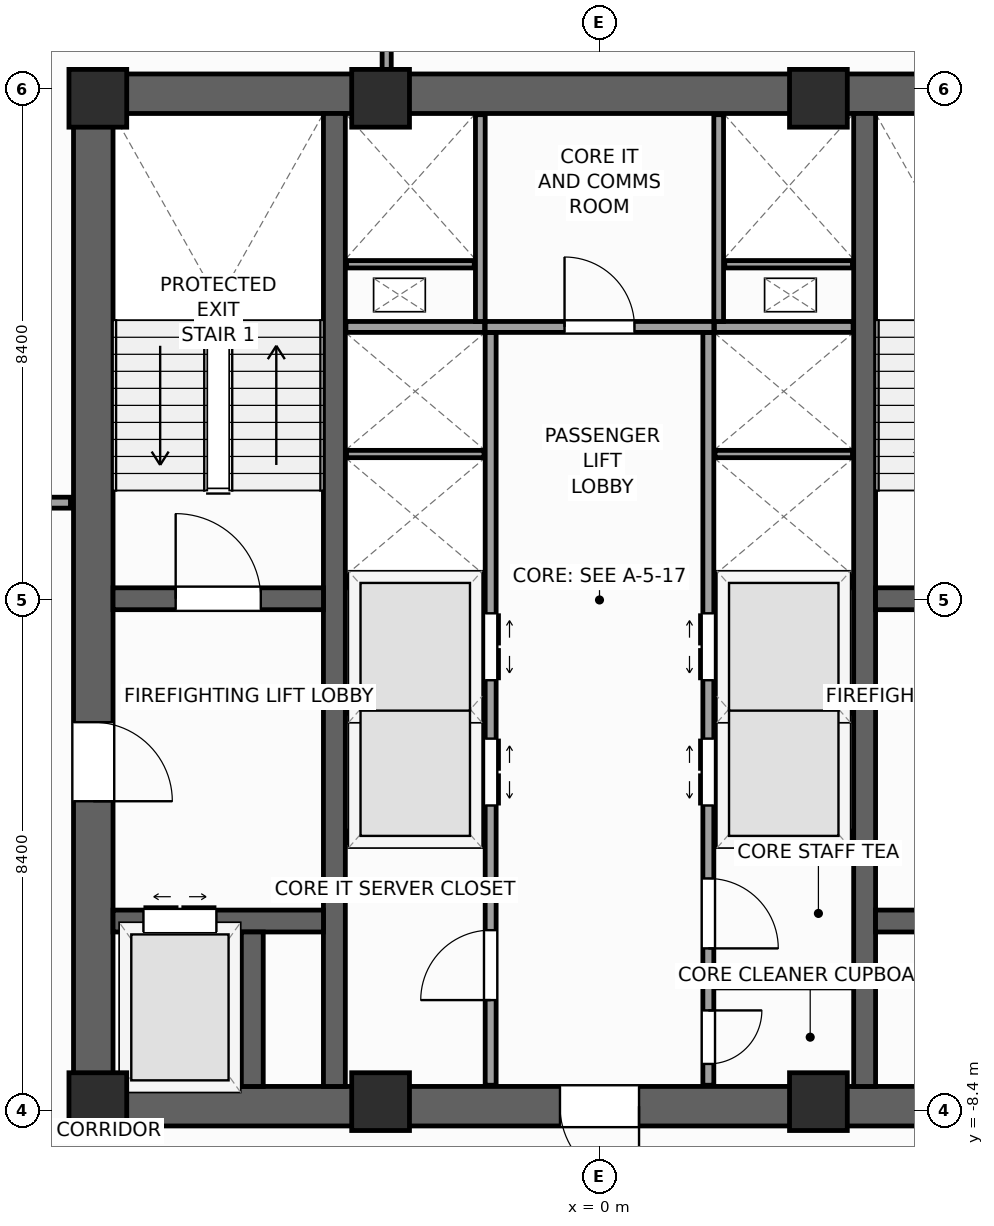
"""IFC4 building model, lengths in metres.
Left out: names, types, materials, properties, quantities, classifications, styles, units other than length and angle.
Written with IfcOpenShell. Run it as: python <this file> out.ifc"""

import sys

from ifc_helpers import new_model, si_unit, direction, frame, frame_2d, origin, origin_2d, place, context, subcontext, project, spatial, rectangle, extrude, source, transform, mapped, element, fill, save


model = new_model("IFC4")
c1 = context("Model", 3, precision=1e-05, world=origin(), true_north=direction((0.0, 1.0)))
c2 = subcontext(c1, "Body", "Model", "MODEL_VIEW")
j1 = project(units=[si_unit("LENGTHUNIT", "METRE"), si_unit("PLANEANGLEUNIT", "RADIAN")], contexts=[c1])
p1 = place(None, origin())
s1 = spatial("IfcSite", under=j1, at=p1, CompositionType="ELEMENT")
p2 = place(p1, origin())
s2 = spatial("IfcBuilding", under=s1, at=p2, CompositionType="ELEMENT")
p3 = place(p2, frame((0.0, 0.0, 164.4)))
s3 = spatial("IfcBuildingStorey", under=s2, at=p3, CompositionType="ELEMENT", Elevation=164.4)
p4 = place(p3, frame((-8.65, -8.325, 0.0), z_axis=(0.0, 0.0, 1.0), x_axis=(1.0, 0.0, 0.0)))
e1 = element("IfcWall", 1, at=p4, inside=s3, PredefinedType="SHEAR", context=c2, shape_type="SweptSolid", body=[
    extrude(rectangle(XDim=17.3, YDim=0.65, at=frame_2d((8.65, 0.0))), origin(), (0.0, 0.0, 1.0), 4.0),
])
p5 = place(p4, frame((8.0, 0.0, 0.0)))
e2 = element("IfcOpeningElement", 2, at=p5, cuts=e1, PredefinedType="OPENING", context=c2, shape_type="SweptSolid", body=[
    extrude(rectangle(XDim=1.3, YDim=2.2, at=frame_2d((0.65, 1.1))), frame((0.0, 0.335, 0.0), z_axis=(0.0, -1.0, 0.0), x_axis=(1.0, 0.0, 0.0)), (0.0, 0.0, 1.0), 0.67),
])
p6 = place(p3, frame((-8.65, 8.325, 0.0), z_axis=(0.0, 0.0, 1.0), x_axis=(1.0, 0.0, 0.0)))
e3 = element("IfcWall", 3, at=p6, inside=s3, PredefinedType="SHEAR", context=c2, shape_type="SweptSolid", body=[
    extrude(rectangle(XDim=17.3, YDim=0.65, at=frame_2d((8.65, 0.0))), origin(), (0.0, 0.0, 1.0), 4.0),
])
p7 = place(p3, frame((-8.325, -8.0, 0.0), z_axis=(0.0, 0.0, 1.0), x_axis=(0.0, 1.0, 0.0)))
e4 = element("IfcWall", 4, at=p7, inside=s3, PredefinedType="SHEAR", context=c2, shape_type="SweptSolid", body=[
    extrude(rectangle(XDim=16.0, YDim=0.65, at=frame_2d((8.0, 0.0))), origin(), (0.0, 0.0, 1.0), 4.0),
])
p8 = place(p7, frame((4.69, 0.0, 0.0)))
e5 = element("IfcOpeningElement", 5, at=p8, cuts=e4, PredefinedType="OPENING", context=c2, shape_type="SweptSolid", body=[
    extrude(rectangle(XDim=1.3, YDim=2.2, at=frame_2d((0.65, 1.1))), frame((0.0, 0.335, 0.0), z_axis=(0.0, -1.0, 0.0), x_axis=(1.0, 0.0, 0.0)), (0.0, 0.0, 1.0), 0.67),
])
for number, where, z_axis, x_axis in (
    (6, (-4.36, -8.0, 0.0), (0.0, 0.0, 1.0), (0.0, 1.0, 0.0)),
    (7, (4.36, -8.0, 0.0), (0.0, 0.0, 1.0), (0.0, 1.0, 0.0)),
):
    element("IfcWall", number, at=place(p3, frame(where, z_axis=z_axis, x_axis=x_axis)), inside=s3, PredefinedType="SHEAR", context=c2, shape_type="SweptSolid", body=[
        extrude(rectangle(XDim=16.0, YDim=0.36, at=frame_2d((8.0, 0.0))), origin(), (0.0, 0.0, 1.0), 4.0),
    ])
p9 = place(p3, frame((-8.0, 0.02, 0.0), z_axis=(0.0, 0.0, 1.0), x_axis=(1.0, 0.0, 0.0)))
e8 = element("IfcWall", 8, at=p9, inside=s3, PredefinedType="SHEAR", context=c2, shape_type="SweptSolid", body=[
    extrude(rectangle(XDim=3.46, YDim=0.36, at=frame_2d((1.73, 0.0))), origin(), (0.0, 0.0, 1.0), 4.0),
])
p10 = place(p9, frame((1.03, 0.0, 0.0)))
e9 = element("IfcOpeningElement", 9, at=p10, cuts=e8, PredefinedType="OPENING", context=c2, shape_type="SweptSolid", body=[
    extrude(rectangle(XDim=1.4, YDim=2.2, at=frame_2d((0.7, 1.1))), frame((0.0, 0.19, 0.0), z_axis=(0.0, -1.0, 0.0), x_axis=(1.0, 0.0, 0.0)), (0.0, 0.0, 1.0), 0.38),
])
p11 = place(p3, frame((4.54, 0.02, 0.0), z_axis=(0.0, 0.0, 1.0), x_axis=(1.0, 0.0, 0.0)))
e10 = element("IfcWall", 10, at=p11, inside=s3, PredefinedType="SHEAR", context=c2, shape_type="SweptSolid", body=[
    extrude(rectangle(XDim=3.46, YDim=0.36, at=frame_2d((1.73, 0.0))), origin(), (0.0, 0.0, 1.0), 4.0),
])
p12 = place(p11, frame((1.03, 0.0, 0.0)))
e11 = element("IfcOpeningElement", 11, at=p12, cuts=e10, PredefinedType="OPENING", context=c2, shape_type="SweptSolid", body=[
    extrude(rectangle(XDim=1.4, YDim=2.2, at=frame_2d((0.7, 1.1))), frame((0.0, 0.19, 0.0), z_axis=(0.0, -1.0, 0.0), x_axis=(1.0, 0.0, 0.0)), (0.0, 0.0, 1.0), 0.38),
])
p13 = place(p3, frame((-8.0, -5.28, 0.0), z_axis=(0.0, 0.0, 1.0), x_axis=(1.0, 0.0, 0.0)))
e12 = element("IfcWall", 12, at=p13, inside=s3, PredefinedType="SHEAR", context=c2, shape_type="SweptSolid", body=[
    extrude(rectangle(XDim=3.46, YDim=0.36, at=frame_2d((1.73, 0.0))), origin(), (0.0, 0.0, 1.0), 4.0),
])
p14 = place(p13, frame((0.5, 0.0, 0.0)))
e13 = element("IfcOpeningElement", 13, at=p14, cuts=e12, PredefinedType="OPENING", context=c2, shape_type="SweptSolid", body=[
    extrude(rectangle(XDim=1.2, YDim=2.25, at=frame_2d((0.6, 1.125))), frame((0.0, 0.19, 0.0), z_axis=(0.0, -1.0, 0.0), x_axis=(1.0, 0.0, 0.0)), (0.0, 0.0, 1.0), 0.38),
])
p15 = place(p3, frame((4.54, -5.28, 0.0), z_axis=(0.0, 0.0, 1.0), x_axis=(1.0, 0.0, 0.0)))
e14 = element("IfcWall", 14, at=p15, inside=s3, PredefinedType="SHEAR", context=c2, shape_type="SweptSolid", body=[
    extrude(rectangle(XDim=3.46, YDim=0.36, at=frame_2d((1.73, 0.0))), origin(), (0.0, 0.0, 1.0), 4.0),
])
p16 = place(p15, frame((1.76, 0.0, 0.0)))
e15 = element("IfcOpeningElement", 15, at=p16, cuts=e14, PredefinedType="OPENING", context=c2, shape_type="SweptSolid", body=[
    extrude(rectangle(XDim=1.2, YDim=2.25, at=frame_2d((0.6, 1.125))), frame((0.0, 0.19, 0.0), z_axis=(0.0, -1.0, 0.0), x_axis=(1.0, 0.0, 0.0)), (0.0, 0.0, 1.0), 0.38),
])
p17 = place(p3, frame((-5.71, -8.0, 0.0), z_axis=(0.0, 0.0, 1.0), x_axis=(0.0, 1.0, 0.0)))
e16 = element("IfcWall", 16, at=p17, inside=s3, PredefinedType="SHEAR", context=c2, shape_type="SweptSolid", body=[
    extrude(rectangle(XDim=2.54, YDim=0.36, at=frame_2d((1.27, 0.0))), origin(), (0.0, 0.0, 1.0), 4.0),
])
m1 = source(origin(), c2, "Body", "SweptSolid", [
    extrude(rectangle(XDim=0.95, YDim=0.95, at=origin_2d()), origin(), (0.0, 0.0, 1.0), 4.0),
])
for number, where, z_axis, x_axis in (
    (17, (-8.25, -8.25, 0.0), (0.0, 0.0, 1.0), (1.0, 0.0, 0.0)),
    (18, (-8.25, 8.25, 0.0), (0.0, 0.0, 1.0), (1.0, 0.0, 0.0)),
    (19, (-3.6, -8.25, 0.0), (0.0, 0.0, 1.0), (1.0, 0.0, 0.0)),
    (20, (3.6, -8.25, 0.0), (0.0, 0.0, 1.0), (1.0, 0.0, 0.0)),
    (21, (-3.6, 8.25, 0.0), (0.0, 0.0, 1.0), (1.0, 0.0, 0.0)),
    (22, (3.6, 8.25, 0.0), (0.0, 0.0, 1.0), (1.0, 0.0, 0.0)),
):
    element("IfcColumn", number, at=place(p3, frame(where, z_axis=z_axis, x_axis=x_axis)), inside=s3, PredefinedType="PILASTER", context=c2, shape_type="MappedRepresentation", body=[
        mapped(m1, transform((0.0, 0.0, 0.0), scale=1.0)),
    ])
p18 = place(p3, frame((-1.79, -7.98, 0.0), z_axis=(0.0, 0.0, 1.0), x_axis=(0.0, 1.0, 0.0)))
e23 = element("IfcWall", 23, at=p18, inside=s3, PredefinedType="PARTITIONING", context=c2, shape_type="SweptSolid", body=[
    extrude(rectangle(XDim=12.38, YDim=0.18, at=frame_2d((6.19, 0.0))), origin(), (0.0, 0.0, 1.0), 3.74),
])
p19 = place(p18, frame((4.6, 0.0, 0.0)))
e24 = element("IfcOpeningElement", 24, at=p19, cuts=e23, PredefinedType="OPENING", context=c2, shape_type="SweptSolid", body=[
    extrude(rectangle(XDim=1.1, YDim=2.2, at=frame_2d((0.55, 1.1))), frame((0.0, 0.1, 0.0), z_axis=(0.0, -1.0, 0.0), x_axis=(1.0, 0.0, 0.0)), (0.0, 0.0, 1.0), 0.2),
])
p20 = place(p18, frame((6.66, 0.0, 0.0)))
e25 = element("IfcOpeningElement", 25, at=p20, cuts=e23, PredefinedType="OPENING", context=c2, shape_type="SweptSolid", body=[
    extrude(rectangle(XDim=1.1, YDim=2.2, at=frame_2d((0.55, 1.1))), frame((0.0, 0.1, 0.0), z_axis=(0.0, -1.0, 0.0), x_axis=(1.0, 0.0, 0.0)), (0.0, 0.0, 1.0), 0.2),
])
p21 = place(p18, frame((1.4, 0.0, 0.0)))
e26 = element("IfcOpeningElement", 26, at=p21, cuts=e23, PredefinedType="OPENING", context=c2, shape_type="SweptSolid", body=[
    extrude(rectangle(XDim=1.15, YDim=2.25, at=frame_2d((0.575, 1.125))), frame((0.0, 0.1, 0.0), z_axis=(0.0, -1.0, 0.0), x_axis=(1.0, 0.0, 0.0)), (0.0, 0.0, 1.0), 0.2),
])
p22 = place(p3, frame((1.79, -7.98, 0.0), z_axis=(0.0, 0.0, 1.0), x_axis=(0.0, 1.0, 0.0)))
e27 = element("IfcWall", 27, at=p22, inside=s3, PredefinedType="PARTITIONING", context=c2, shape_type="SweptSolid", body=[
    extrude(rectangle(XDim=12.38, YDim=0.18, at=frame_2d((6.19, 0.0))), origin(), (0.0, 0.0, 1.0), 3.74),
])
p23 = place(p22, frame((4.6, 0.0, 0.0)))
e28 = element("IfcOpeningElement", 28, at=p23, cuts=e27, PredefinedType="OPENING", context=c2, shape_type="SweptSolid", body=[
    extrude(rectangle(XDim=1.1, YDim=2.2, at=frame_2d((0.55, 1.1))), frame((0.0, 0.1, 0.0), z_axis=(0.0, -1.0, 0.0), x_axis=(1.0, 0.0, 0.0)), (0.0, 0.0, 1.0), 0.2),
])
p24 = place(p22, frame((6.66, 0.0, 0.0)))
e29 = element("IfcOpeningElement", 29, at=p24, cuts=e27, PredefinedType="OPENING", context=c2, shape_type="SweptSolid", body=[
    extrude(rectangle(XDim=1.1, YDim=2.2, at=frame_2d((0.55, 1.1))), frame((0.0, 0.1, 0.0), z_axis=(0.0, -1.0, 0.0), x_axis=(1.0, 0.0, 0.0)), (0.0, 0.0, 1.0), 0.2),
])
p25 = place(p22, frame((0.35, 0.0, 0.0)))
e30 = element("IfcOpeningElement", 30, at=p25, cuts=e27, PredefinedType="OPENING", context=c2, shape_type="SweptSolid", body=[
    extrude(rectangle(XDim=0.88, YDim=2.1, at=frame_2d((0.44, 1.05))), frame((0.0, 0.1, 0.0), z_axis=(0.0, -1.0, 0.0), x_axis=(1.0, 0.0, 0.0)), (0.0, 0.0, 1.0), 0.2),
])
p26 = place(p22, frame((2.25, 0.0, 0.0)))
e31 = element("IfcOpeningElement", 31, at=p26, cuts=e27, PredefinedType="OPENING", context=c2, shape_type="SweptSolid", body=[
    extrude(rectangle(XDim=1.15, YDim=2.25, at=frame_2d((0.575, 1.125))), frame((0.0, 0.1, 0.0), z_axis=(0.0, -1.0, 0.0), x_axis=(1.0, 0.0, 0.0)), (0.0, 0.0, 1.0), 0.2),
])
p27 = place(p3, frame((-1.88, 4.49, 0.0), z_axis=(0.0, 0.0, 1.0), x_axis=(1.0, 0.0, 0.0)))
e32 = element("IfcWall", 32, at=p27, inside=s3, PredefinedType="PARTITIONING", context=c2, shape_type="SweptSolid", body=[
    extrude(rectangle(XDim=3.76, YDim=0.18, at=frame_2d((1.88, 0.0))), origin(), (0.0, 0.0, 1.0), 3.74),
])
p28 = place(p27, frame((1.305, 0.0, 0.0)))
e33 = element("IfcOpeningElement", 33, at=p28, cuts=e32, PredefinedType="OPENING", context=c2, shape_type="SweptSolid", body=[
    extrude(rectangle(XDim=1.15, YDim=2.25, at=frame_2d((0.575, 1.125))), frame((0.0, 0.1, 0.0), z_axis=(0.0, -1.0, 0.0), x_axis=(1.0, 0.0, 0.0)), (0.0, 0.0, 1.0), 0.2),
])
for number, where, z_axis, x_axis in (
    (34, (-4.17, -3.9, 0.0), (0.0, 0.0, 1.0), (1.0, 0.0, 0.0)),
    (35, (1.89, -3.9, 0.0), (0.0, 0.0, 1.0), (1.0, 0.0, 0.0)),
    (36, (-4.17, 0.3, 0.0), (0.0, 0.0, 1.0), (1.0, 0.0, 0.0)),
    (37, (1.89, 0.3, 0.0), (0.0, 0.0, 1.0), (1.0, 0.0, 0.0)),
    (38, (-4.17, 4.49, 0.0), (0.0, 0.0, 1.0), (1.0, 0.0, 0.0)),
    (39, (1.89, 4.49, 0.0), (0.0, 0.0, 1.0), (1.0, 0.0, 0.0)),
):
    element("IfcWall", number, at=place(p3, frame(where, z_axis=z_axis, x_axis=x_axis)), inside=s3, PredefinedType="PARTITIONING", context=c2, shape_type="SweptSolid", body=[
        extrude(rectangle(XDim=2.28, YDim=0.18, at=frame_2d((1.14, 0.0))), origin(), (0.0, 0.0, 1.0), 3.74),
    ])
for number, where, z_axis, x_axis in (
    (40, (-4.16, -1.8, 0.0), (0.0, 0.0, 1.0), (1.0, 0.0, 0.0)),
    (41, (1.9, -1.8, 0.0), (0.0, 0.0, 1.0), (1.0, 0.0, 0.0)),
    (42, (-4.16, 2.4, 0.0), (0.0, 0.0, 1.0), (1.0, 0.0, 0.0)),
    (43, (1.9, 2.4, 0.0), (0.0, 0.0, 1.0), (1.0, 0.0, 0.0)),
):
    element("IfcWall", number, at=place(p3, frame(where, z_axis=z_axis, x_axis=x_axis)), inside=s3, PredefinedType="PARTITIONING", context=c2, shape_type="SweptSolid", body=[
        extrude(rectangle(XDim=2.26, YDim=0.12, at=frame_2d((1.13, 0.0))), origin(), (0.0, 0.0, 1.0), 3.74),
    ])
p29 = place(p3, frame((1.89, -6.3, 0.0), z_axis=(0.0, 0.0, 1.0), x_axis=(1.0, 0.0, 0.0)))
e44 = element("IfcWall", 44, at=p29, inside=s3, PredefinedType="PARTITIONING", context=c2, shape_type="SweptSolid", body=[
    extrude(rectangle(XDim=2.28, YDim=0.16, at=frame_2d((1.14, 0.0))), origin(), (0.0, 0.0, 1.0), 3.74),
])
for number, where, z_axis, x_axis in (
    (45, (-1.96, 4.58, 0.0), (0.0, 0.0, 1.0), (0.0, 1.0, 0.0)),
    (46, (1.96, 4.58, 0.0), (0.0, 0.0, 1.0), (0.0, 1.0, 0.0)),
):
    element("IfcWall", number, at=place(p3, frame(where, z_axis=z_axis, x_axis=x_axis)), inside=s3, PredefinedType="PARTITIONING", context=c2, shape_type="SweptSolid", body=[
        extrude(rectangle(XDim=3.4, YDim=0.16, at=frame_2d((1.7, 0.0))), origin(), (0.0, 0.0, 1.0), 3.74),
    ])
for number, where, z_axis, x_axis in (
    (47, (-4.16, 5.52, 0.0), (0.0, 0.0, 1.0), (1.0, 0.0, 0.0)),
    (48, (2.06, 5.52, 0.0), (0.0, 0.0, 1.0), (1.0, 0.0, 0.0)),
):
    element("IfcWall", number, at=place(p3, frame(where, z_axis=z_axis, x_axis=x_axis)), inside=s3, PredefinedType="PARTITIONING", context=c2, shape_type="SweptSolid", body=[
        extrude(rectangle(XDim=2.1, YDim=0.12, at=frame_2d((1.05, 0.0))), origin(), (0.0, 0.0, 1.0), 3.74),
    ])
p30 = place(p3, frame((-11.55, 1.6, 0.0), z_axis=(0.0, 0.0, 1.0), x_axis=(1.0, 0.0, 0.0)))
e49 = element("IfcWall", 49, at=p30, inside=s3, PredefinedType="PARTITIONING", context=c2, shape_type="SweptSolid", body=[
    extrude(rectangle(XDim=2.85, YDim=0.18, at=frame_2d((1.425, 0.0))), origin(), (0.0, 0.0, 1.0), 3.74),
])
p31 = place(p30, frame((0.875, 0.0, 0.0)))
e50 = element("IfcOpeningElement", 50, at=p31, cuts=e49, PredefinedType="OPENING", context=c2, shape_type="SweptSolid", body=[
    extrude(rectangle(XDim=1.1, YDim=2.2, at=frame_2d((0.55, 1.1))), frame((0.0, 0.1, 0.0), z_axis=(0.0, -1.0, 0.0), x_axis=(1.0, 0.0, 0.0)), (0.0, 0.0, 1.0), 0.2),
])
p32 = place(p3, frame((-3.5, 8.655, 0.0), z_axis=(0.0, 0.0, 1.0), x_axis=(0.0, 1.0, 0.0)))
e51 = element("IfcWall", 51, at=p32, inside=s3, PredefinedType="PARTITIONING", context=c2, shape_type="SweptSolid", body=[
    extrude(rectangle(XDim=19.411, YDim=0.15, at=frame_2d((9.706, 0.0))), origin(), (0.0, 0.0, 1.0), 3.74),
])
m2 = source(origin(), c2, "Body", "SweptSolid", [
    extrude(rectangle(XDim=1.4, YDim=2.2, at=frame_2d((0.7, 1.1))), frame((0.0, 0.025, 0.0), z_axis=(0.0, -1.0, 0.0), x_axis=(1.0, 0.0, 0.0)), (0.0, 0.0, 1.0), 0.05),
])
p33 = place(p10, origin())
e52 = element("IfcDoor", 52, at=p33, inside=s3, OperationType="SINGLE_SWING_LEFT", PredefinedType="DOOR", context=c2, shape_type="MappedRepresentation", body=[
    mapped(m2, transform((0.0, 0.0, 0.0), scale=1.0)),
])
fill(e9, e52)
m3 = source(origin(), c2, "Body", "SweptSolid", [
    extrude(rectangle(XDim=1.3, YDim=2.2, at=frame_2d((0.65, 1.1))), frame((0.0, 0.025, 0.0), z_axis=(0.0, -1.0, 0.0), x_axis=(1.0, 0.0, 0.0)), (0.0, 0.0, 1.0), 0.05),
])
p34 = place(p8, frame((1.3, 0.0, 0.0), z_axis=(0.0, 0.0, 1.0), x_axis=(-1.0, 0.0, 0.0)))
e53 = element("IfcDoor", 53, at=p34, inside=s3, OperationType="SINGLE_SWING_LEFT", PredefinedType="DOOR", context=c2, shape_type="MappedRepresentation", body=[
    mapped(m3, transform((0.0, 0.0, 0.0), scale=1.0)),
])
fill(e5, e53)
p35 = place(p5, frame((1.3, 0.0, 0.0), z_axis=(0.0, 0.0, 1.0), x_axis=(-1.0, 0.0, 0.0)))
e54 = element("IfcDoor", 54, at=p35, inside=s3, OperationType="SINGLE_SWING_RIGHT", PredefinedType="DOOR", context=c2, shape_type="MappedRepresentation", body=[
    mapped(m3, transform((0.0, 0.0, 0.0), scale=1.0)),
])
fill(e2, e54)
m4 = source(origin(), c2, "Body", "SweptSolid", [
    extrude(rectangle(XDim=1.2, YDim=2.25, at=frame_2d((0.6, 1.125))), frame((0.0, 0.025, 0.0), z_axis=(0.0, -1.0, 0.0), x_axis=(1.0, 0.0, 0.0)), (0.0, 0.0, 1.0), 0.05),
])
p36 = place(p14, origin())
e55 = element("IfcDoor", 55, at=p36, inside=s3, OperationType="DOUBLE_DOOR_SLIDING", PredefinedType="DOOR", context=c2, shape_type="MappedRepresentation", body=[
    mapped(m4, transform((0.0, 0.0, 0.0), scale=1.0)),
])
fill(e13, e55)
m5 = source(origin(), c2, "Body", "SweptSolid", [
    extrude(rectangle(XDim=1.1, YDim=2.2, at=frame_2d((0.55, 1.1))), frame((0.0, 0.025, 0.0), z_axis=(0.0, -1.0, 0.0), x_axis=(1.0, 0.0, 0.0)), (0.0, 0.0, 1.0), 0.05),
])
p37 = place(p19, frame((1.1, 0.0, 0.0), z_axis=(0.0, 0.0, 1.0), x_axis=(-1.0, 0.0, 0.0)))
e56 = element("IfcDoor", 56, at=p37, inside=s3, OperationType="DOUBLE_DOOR_SLIDING", PredefinedType="DOOR", context=c2, shape_type="MappedRepresentation", body=[
    mapped(m5, transform((0.0, 0.0, 0.0), scale=1.0)),
])
fill(e24, e56)
p38 = place(p20, frame((1.1, 0.0, 0.0), z_axis=(0.0, 0.0, 1.0), x_axis=(-1.0, 0.0, 0.0)))
e57 = element("IfcDoor", 57, at=p38, inside=s3, OperationType="DOUBLE_DOOR_SLIDING", PredefinedType="DOOR", context=c2, shape_type="MappedRepresentation", body=[
    mapped(m5, transform((0.0, 0.0, 0.0), scale=1.0)),
])
fill(e25, e57)
p39 = place(p23, origin())
e58 = element("IfcDoor", 58, at=p39, inside=s3, OperationType="DOUBLE_DOOR_SLIDING", PredefinedType="DOOR", context=c2, shape_type="MappedRepresentation", body=[
    mapped(m5, transform((0.0, 0.0, 0.0), scale=1.0)),
])
fill(e28, e58)
p40 = place(p24, origin())
e59 = element("IfcDoor", 59, at=p40, inside=s3, OperationType="DOUBLE_DOOR_SLIDING", PredefinedType="DOOR", context=c2, shape_type="MappedRepresentation", body=[
    mapped(m5, transform((0.0, 0.0, 0.0), scale=1.0)),
])
fill(e29, e59)
m6 = source(origin(), c2, "Body", "SweptSolid", [
    extrude(rectangle(XDim=1.15, YDim=2.25, at=frame_2d((0.575, 1.125))), frame((0.0, 0.025, 0.0), z_axis=(0.0, -1.0, 0.0), x_axis=(1.0, 0.0, 0.0)), (0.0, 0.0, 1.0), 0.05),
])
p41 = place(p21, origin())
e60 = element("IfcDoor", 60, at=p41, inside=s3, OperationType="SINGLE_SWING_LEFT", PredefinedType="DOOR", context=c2, shape_type="MappedRepresentation", body=[
    mapped(m6, transform((0.0, 0.0, 0.0), scale=1.0)),
])
fill(e26, e60)
m7 = source(origin(), c2, "Body", "SweptSolid", [
    extrude(rectangle(XDim=0.88, YDim=2.1, at=frame_2d((0.44, 1.05))), frame((0.0, 0.025, 0.0), z_axis=(0.0, -1.0, 0.0), x_axis=(1.0, 0.0, 0.0)), (0.0, 0.0, 1.0), 0.05),
])
p42 = place(p25, frame((0.88, 0.0, 0.0), z_axis=(0.0, 0.0, 1.0), x_axis=(-1.0, 0.0, 0.0)))
e61 = element("IfcDoor", 61, at=p42, inside=s3, OperationType="SINGLE_SWING_RIGHT", PredefinedType="DOOR", context=c2, shape_type="MappedRepresentation", body=[
    mapped(m7, transform((0.0, 0.0, 0.0), scale=1.0)),
])
fill(e30, e61)
p43 = place(p26, frame((1.15, 0.0, 0.0), z_axis=(0.0, 0.0, 1.0), x_axis=(-1.0, 0.0, 0.0)))
e62 = element("IfcDoor", 62, at=p43, inside=s3, OperationType="SINGLE_SWING_LEFT", PredefinedType="DOOR", context=c2, shape_type="MappedRepresentation", body=[
    mapped(m6, transform((0.0, 0.0, 0.0), scale=1.0)),
])
fill(e31, e62)
p44 = place(p28, origin())
e63 = element("IfcDoor", 63, at=p44, inside=s3, OperationType="SINGLE_SWING_LEFT", PredefinedType="DOOR", context=c2, shape_type="MappedRepresentation", body=[
    mapped(m6, transform((0.0, 0.0, 0.0), scale=1.0)),
])
fill(e33, e63)
save(model, sys.argv[1])
